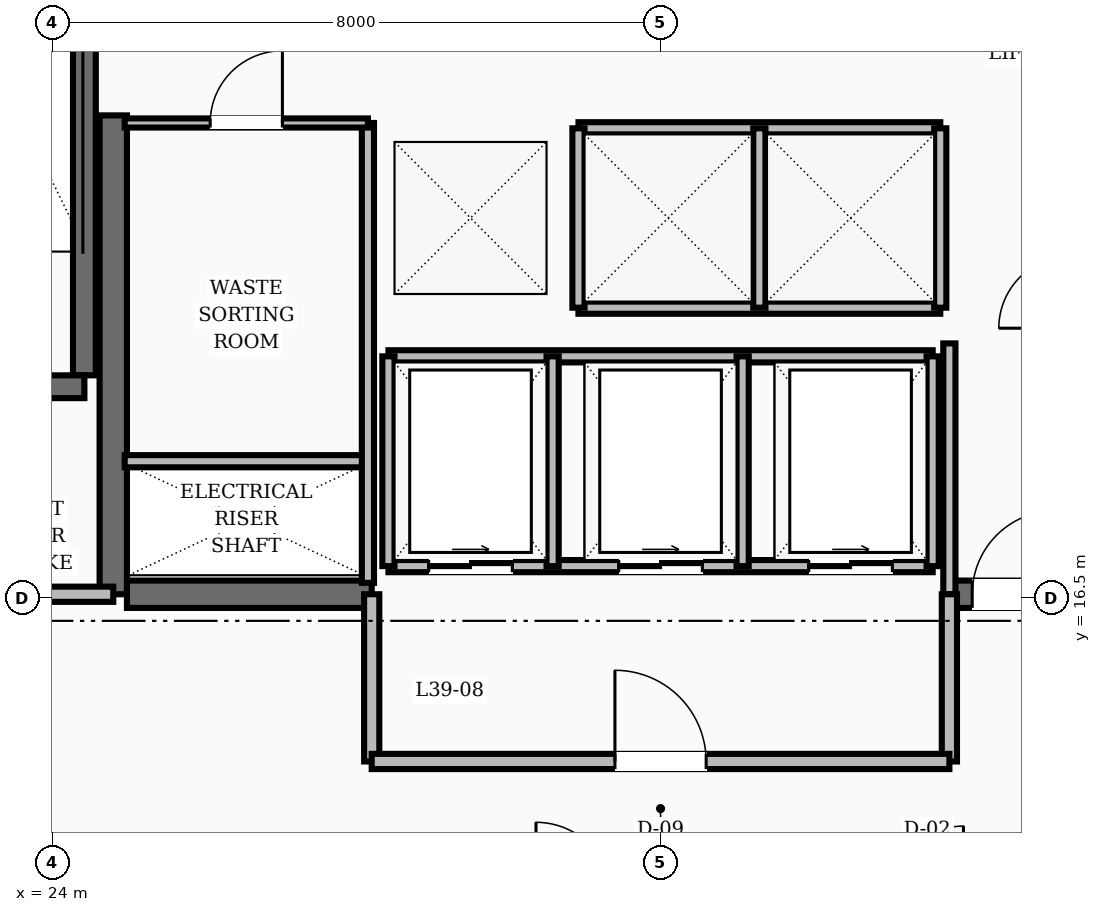
"""IFC4 building model, lengths in metres.
Left out: names, types, materials, properties, quantities, classifications, styles, units other than length and angle.
Written with IfcOpenShell. Run it as: python <this file> out.ifc"""

import sys

from ifc_helpers import new_model, si_unit, direction, frame, frame_2d, origin, place, context, subcontext, project, spatial, rectangle, extrude, element, fill, save


model = new_model("IFC4")
c1 = context("Model", 3, precision=1e-05, world=origin(), true_north=direction((0.0, 1.0)))
c2 = subcontext(c1, "Body", "Model", "MODEL_VIEW")
j1 = project(units=[si_unit("LENGTHUNIT", "METRE"), si_unit("PLANEANGLEUNIT", "RADIAN")], contexts=[c1])
p1 = place(None, origin())
s1 = spatial("IfcSite", under=j1, at=p1, CompositionType="ELEMENT")
p2 = place(p1, origin())
s2 = spatial("IfcBuilding", under=s1, at=p2, CompositionType="ELEMENT")
p3 = place(p2, frame((0.0, 0.0, 153.2)))
s3 = spatial("IfcBuildingStorey", under=s2, at=p3, CompositionType="ELEMENT", Elevation=153.2)
p4 = place(p3, frame((24.8, 16.55, 0.0), z_axis=(0.0, 0.0, 1.0), x_axis=(0.0, 1.0, 0.0)))
e1 = element("IfcWall", 1, at=p4, inside=s3, PredefinedType="SHEAR", context=c2, shape_type="SweptSolid", body=[
    extrude(rectangle(XDim=6.3, YDim=0.36, at=frame_2d((3.15, 0.0))), origin(), (0.0, 0.0, 1.0), 3.6),
])
p5 = place(p3, frame((24.98, 16.55, 0.0), z_axis=(0.0, 0.0, 1.0), x_axis=(1.0, 0.0, 0.0)))
e2 = element("IfcWall", 2, at=p5, inside=s3, PredefinedType="SHEAR", context=c2, shape_type="SweptSolid", body=[
    extrude(rectangle(XDim=3.22, YDim=0.36, at=frame_2d((1.61, 0.0))), origin(), (0.0, 0.0, 1.0), 3.6),
])
p6 = place(p3, frame((35.8, 16.55, 0.0), z_axis=(0.0, 0.0, 1.0), x_axis=(1.0, 0.0, 0.0)))
e3 = element("IfcWall", 3, at=p6, inside=s3, PredefinedType="SHEAR", context=c2, shape_type="SweptSolid", body=[
    extrude(rectangle(XDim=3.22, YDim=0.36, at=frame_2d((1.61, 0.0))), origin(), (0.0, 0.0, 1.0), 3.6),
])
p7 = place(p6, frame((0.3, 0.0, 0.0)))
e4 = element("IfcOpeningElement", 4, at=p7, cuts=e3, PredefinedType="OPENING", context=c2, shape_type="SweptSolid", body=[
    extrude(rectangle(XDim=1.1, YDim=2.1, at=frame_2d((0.55, 1.05))), frame((0.0, 0.19, 0.0), z_axis=(0.0, -1.0, 0.0), x_axis=(1.0, 0.0, 0.0)), (0.0, 0.0, 1.0), 0.38),
])
p8 = place(p3, frame((24.42, 19.43, 0.0), z_axis=(0.0, 0.0, 1.0), x_axis=(0.0, 1.0, 0.0)))
e5 = element("IfcWall", 5, at=p8, inside=s3, PredefinedType="SHEAR", context=c2, shape_type="SweptSolid", body=[
    extrude(rectangle(XDim=8.74, YDim=0.3, at=frame_2d((4.37, 0.0))), origin(), (0.0, 0.0, 1.0), 3.6),
])
p9 = place(p3, frame((20.82, 19.28, 0.0), z_axis=(0.0, 0.0, 1.0), x_axis=(1.0, 0.0, 0.0)))
e6 = element("IfcWall", 6, at=p9, inside=s3, PredefinedType="SHEAR", context=c2, shape_type="SweptSolid", body=[
    extrude(rectangle(XDim=3.6, YDim=0.3, at=frame_2d((1.8, 0.0))), origin(), (0.0, 0.0, 1.0), 3.6),
])
p10 = place(p9, frame((1.3, 0.0, 0.0)))
e7 = element("IfcOpeningElement", 7, at=p10, cuts=e6, PredefinedType="OPENING", context=c2, shape_type="SweptSolid", body=[
    extrude(rectangle(XDim=1.1, YDim=2.1, at=frame_2d((0.55, 1.05))), frame((0.0, 0.16, 0.0), z_axis=(0.0, -1.0, 0.0), x_axis=(1.0, 0.0, 0.0)), (0.0, 0.0, 1.0), 0.32),
])
p11 = place(p3, frame((20.82, 16.55, 0.0), z_axis=(0.0, 0.0, 1.0), x_axis=(1.0, 0.0, 0.0)))
e8 = element("IfcWall", 8, at=p11, inside=s3, PredefinedType="SOLIDWALL", context=c2, shape_type="SweptSolid", body=[
    extrude(rectangle(XDim=3.98, YDim=0.2, at=frame_2d((1.99, 0.0))), origin(), (0.0, 0.0, 1.0), 2.8),
])
p12 = place(p3, frame((35.8, 16.55, 0.0), z_axis=(0.0, 0.0, 1.0), x_axis=(0.0, 1.0, 0.0)))
e9 = element("IfcWall", 9, at=p12, inside=s3, PredefinedType="SOLIDWALL", context=c2, shape_type="SweptSolid", body=[
    extrude(rectangle(XDim=3.3, YDim=0.16, at=frame_2d((1.65, 0.0))), origin(), (0.0, 0.0, 1.0), 2.8),
])
for number, where, z_axis, x_axis in (
    (10, (28.2, 14.35, 0.0), (0.0, 0.0, 1.0), (0.0, 1.0, 0.0)),
    (11, (35.8, 14.35, 0.0), (0.0, 0.0, 1.0), (0.0, 1.0, 0.0)),
):
    element("IfcWall", number, at=place(p3, frame(where, z_axis=z_axis, x_axis=x_axis)), inside=s3, PredefinedType="SOLIDWALL", context=c2, shape_type="SweptSolid", body=[
        extrude(rectangle(XDim=2.2, YDim=0.2, at=frame_2d((1.1, 0.0))), origin(), (0.0, 0.0, 1.0), 2.8),
    ])
p13 = place(p3, frame((28.2, 14.35, 0.0), z_axis=(0.0, 0.0, 1.0), x_axis=(1.0, 0.0, 0.0)))
e12 = element("IfcWall", 12, at=p13, inside=s3, PredefinedType="SOLIDWALL", context=c2, shape_type="SweptSolid", body=[
    extrude(rectangle(XDim=7.6, YDim=0.2, at=frame_2d((3.8, 0.0))), origin(), (0.0, 0.0, 1.0), 2.8),
])
p14 = place(p13, frame((3.2, 0.0, 0.0)))
e13 = element("IfcOpeningElement", 13, at=p14, cuts=e12, PredefinedType="OPENING", context=c2, shape_type="SweptSolid", body=[
    extrude(rectangle(XDim=1.2, YDim=2.1, at=frame_2d((0.6, 1.05))), frame((0.0, 0.11, 0.0), z_axis=(0.0, -1.0, 0.0), x_axis=(1.0, 0.0, 0.0)), (0.0, 0.0, 1.0), 0.22),
])
for number, where, z_axis, x_axis in (
    (14, (30.92, 22.68, 0.0), (0.0, 0.0, 1.0), (1.0, 0.0, 0.0)),
    (15, (30.92, 20.32, 0.0), (0.0, 0.0, 1.0), (1.0, 0.0, 0.0)),
):
    element("IfcWall", number, at=place(p3, frame(where, z_axis=z_axis, x_axis=x_axis)), inside=s3, PredefinedType="SOLIDWALL", context=c2, shape_type="SweptSolid", body=[
        extrude(rectangle(XDim=4.76, YDim=0.16, at=frame_2d((2.38, 0.0))), origin(), (0.0, 0.0, 1.0), 2.8),
    ])
for number, where, z_axis, x_axis in (
    (16, (30.92, 20.32, 0.0), (0.0, 0.0, 1.0), (0.0, 1.0, 0.0)),
    (17, (33.3, 20.32, 0.0), (0.0, 0.0, 1.0), (0.0, 1.0, 0.0)),
    (18, (35.68, 20.32, 0.0), (0.0, 0.0, 1.0), (0.0, 1.0, 0.0)),
):
    element("IfcWall", number, at=place(p3, frame(where, z_axis=z_axis, x_axis=x_axis)), inside=s3, PredefinedType="SOLIDWALL", context=c2, shape_type="SweptSolid", body=[
        extrude(rectangle(XDim=2.36, YDim=0.16, at=frame_2d((1.18, 0.0))), origin(), (0.0, 0.0, 1.0), 2.8),
    ])
p15 = place(p3, frame((28.42, 16.92, 0.0), z_axis=(0.0, 0.0, 1.0), x_axis=(1.0, 0.0, 0.0)))
e19 = element("IfcWall", 19, at=p15, inside=s3, PredefinedType="SOLIDWALL", context=c2, shape_type="SweptSolid", body=[
    extrude(rectangle(XDim=7.16, YDim=0.16, at=frame_2d((3.58, 0.0))), origin(), (0.0, 0.0, 1.0), 2.8),
])
p16 = place(p15, frame((0.53, 0.0, 0.0)))
e20 = element("IfcOpeningElement", 20, at=p16, cuts=e19, PredefinedType="OPENING", context=c2, shape_type="SweptSolid", body=[
    extrude(rectangle(XDim=1.1, YDim=2.15, at=frame_2d((0.55, 1.075))), frame((0.0, 0.09, 0.0), z_axis=(0.0, -1.0, 0.0), x_axis=(1.0, 0.0, 0.0)), (0.0, 0.0, 1.0), 0.18),
])
p17 = place(p15, frame((3.03, 0.0, 0.0)))
e21 = element("IfcOpeningElement", 21, at=p17, cuts=e19, PredefinedType="OPENING", context=c2, shape_type="SweptSolid", body=[
    extrude(rectangle(XDim=1.1, YDim=2.15, at=frame_2d((0.55, 1.075))), frame((0.0, 0.09, 0.0), z_axis=(0.0, -1.0, 0.0), x_axis=(1.0, 0.0, 0.0)), (0.0, 0.0, 1.0), 0.18),
])
p18 = place(p15, frame((5.53, 0.0, 0.0)))
e22 = element("IfcOpeningElement", 22, at=p18, cuts=e19, PredefinedType="OPENING", context=c2, shape_type="SweptSolid", body=[
    extrude(rectangle(XDim=1.1, YDim=2.15, at=frame_2d((0.55, 1.075))), frame((0.0, 0.09, 0.0), z_axis=(0.0, -1.0, 0.0), x_axis=(1.0, 0.0, 0.0)), (0.0, 0.0, 1.0), 0.18),
])
p19 = place(p3, frame((28.42, 19.68, 0.0), z_axis=(0.0, 0.0, 1.0), x_axis=(1.0, 0.0, 0.0)))
e23 = element("IfcWall", 23, at=p19, inside=s3, PredefinedType="SOLIDWALL", context=c2, shape_type="SweptSolid", body=[
    extrude(rectangle(XDim=7.16, YDim=0.16, at=frame_2d((3.58, 0.0))), origin(), (0.0, 0.0, 1.0), 2.8),
])
for number, where, z_axis, x_axis in (
    (24, (28.42, 16.92, 0.0), (0.0, 0.0, 1.0), (0.0, 1.0, 0.0)),
    (25, (30.58, 16.92, 0.0), (0.0, 0.0, 1.0), (0.0, 1.0, 0.0)),
    (26, (33.08, 16.92, 0.0), (0.0, 0.0, 1.0), (0.0, 1.0, 0.0)),
    (27, (35.58, 16.92, 0.0), (0.0, 0.0, 1.0), (0.0, 1.0, 0.0)),
):
    element("IfcWall", number, at=place(p3, frame(where, z_axis=z_axis, x_axis=x_axis)), inside=s3, PredefinedType="SOLIDWALL", context=c2, shape_type="SweptSolid", body=[
        extrude(rectangle(XDim=2.76, YDim=0.16, at=frame_2d((1.38, 0.0))), origin(), (0.0, 0.0, 1.0), 2.8),
    ])
p20 = place(p3, frame((24.95, 18.3, 0.0), z_axis=(0.0, 0.0, 1.0), x_axis=(1.0, 0.0, 0.0)))
e28 = element("IfcWall", 28, at=p20, inside=s3, PredefinedType="SOLIDWALL", context=c2, shape_type="SweptSolid", body=[
    extrude(rectangle(XDim=3.2, YDim=0.16, at=frame_2d((1.6, 0.0))), origin(), (0.0, 0.0, 1.0), 2.8),
])
p21 = place(p3, frame((28.15, 16.7, 0.0), z_axis=(0.0, 0.0, 1.0), x_axis=(0.0, 1.0, 0.0)))
e29 = element("IfcWall", 29, at=p21, inside=s3, PredefinedType="SOLIDWALL", context=c2, shape_type="SweptSolid", body=[
    extrude(rectangle(XDim=6.05, YDim=0.16, at=frame_2d((3.025, 0.0))), origin(), (0.0, 0.0, 1.0), 2.8),
])
p22 = place(p3, frame((24.95, 22.75, 0.0), z_axis=(0.0, 0.0, 1.0), x_axis=(1.0, 0.0, 0.0)))
e30 = element("IfcWall", 30, at=p22, inside=s3, PredefinedType="PARTITIONING", context=c2, shape_type="SweptSolid", body=[
    extrude(rectangle(XDim=3.2, YDim=0.12, at=frame_2d((1.6, 0.0))), origin(), (0.0, 0.0, 1.0), 2.8),
])
p23 = place(p22, frame((1.125, 0.0, 0.0)))
e31 = element("IfcOpeningElement", 31, at=p23, cuts=e30, PredefinedType="OPENING", context=c2, shape_type="SweptSolid", body=[
    extrude(rectangle(XDim=0.95, YDim=2.1, at=frame_2d((0.475, 1.05))), frame((0.0, 0.07, 0.0), z_axis=(0.0, -1.0, 0.0), x_axis=(1.0, 0.0, 0.0)), (0.0, 0.0, 1.0), 0.14),
])
p24 = place(p7, origin())
e32 = element("IfcDoor", 32, at=p24, inside=s3, OperationType="SINGLE_SWING_RIGHT", PredefinedType="DOOR", context=c2, shape_type="SweptSolid", body=[
    extrude(rectangle(XDim=1.1, YDim=2.1, at=frame_2d((0.55, 1.05))), frame((0.0, 0.025, 0.0), z_axis=(0.0, -1.0, 0.0), x_axis=(1.0, 0.0, 0.0)), (0.0, 0.0, 1.0), 0.05),
])
fill(e4, e32)
p25 = place(p14, origin())
e33 = element("IfcDoor", 33, at=p25, inside=s3, OperationType="SINGLE_SWING_LEFT", PredefinedType="DOOR", context=c2, shape_type="SweptSolid", body=[
    extrude(rectangle(XDim=1.2, YDim=2.1, at=frame_2d((0.6, 1.05))), frame((0.0, 0.025, 0.0), z_axis=(0.0, -1.0, 0.0), x_axis=(1.0, 0.0, 0.0)), (0.0, 0.0, 1.0), 0.05),
])
fill(e13, e33)
p26 = place(p16, origin())
e34 = element("IfcDoor", 34, at=p26, inside=s3, OperationType="SLIDING_TO_RIGHT", PredefinedType="DOOR", context=c2, shape_type="SweptSolid", body=[
    extrude(rectangle(XDim=1.1, YDim=2.15, at=frame_2d((0.55, 1.075))), frame((0.0, 0.025, 0.0), z_axis=(0.0, -1.0, 0.0), x_axis=(1.0, 0.0, 0.0)), (0.0, 0.0, 1.0), 0.05),
])
fill(e20, e34)
p27 = place(p17, origin())
e35 = element("IfcDoor", 35, at=p27, inside=s3, OperationType="SLIDING_TO_RIGHT", PredefinedType="DOOR", context=c2, shape_type="SweptSolid", body=[
    extrude(rectangle(XDim=1.1, YDim=2.15, at=frame_2d((0.55, 1.075))), frame((0.0, 0.025, 0.0), z_axis=(0.0, -1.0, 0.0), x_axis=(1.0, 0.0, 0.0)), (0.0, 0.0, 1.0), 0.05),
])
fill(e21, e35)
p28 = place(p18, origin())
e36 = element("IfcDoor", 36, at=p28, inside=s3, OperationType="SLIDING_TO_RIGHT", PredefinedType="DOOR", context=c2, shape_type="SweptSolid", body=[
    extrude(rectangle(XDim=1.1, YDim=2.15, at=frame_2d((0.55, 1.075))), frame((0.0, 0.025, 0.0), z_axis=(0.0, -1.0, 0.0), x_axis=(1.0, 0.0, 0.0)), (0.0, 0.0, 1.0), 0.05),
])
fill(e22, e36)
p29 = place(p23, origin())
e37 = element("IfcDoor", 37, at=p29, inside=s3, OperationType="SINGLE_SWING_RIGHT", PredefinedType="DOOR", context=c2, shape_type="SweptSolid", body=[
    extrude(rectangle(XDim=0.95, YDim=2.1, at=frame_2d((0.475, 1.05))), frame((0.0, 0.025, 0.0), z_axis=(0.0, -1.0, 0.0), x_axis=(1.0, 0.0, 0.0)), (0.0, 0.0, 1.0), 0.05),
])
fill(e31, e37)
save(model, sys.argv[1])
